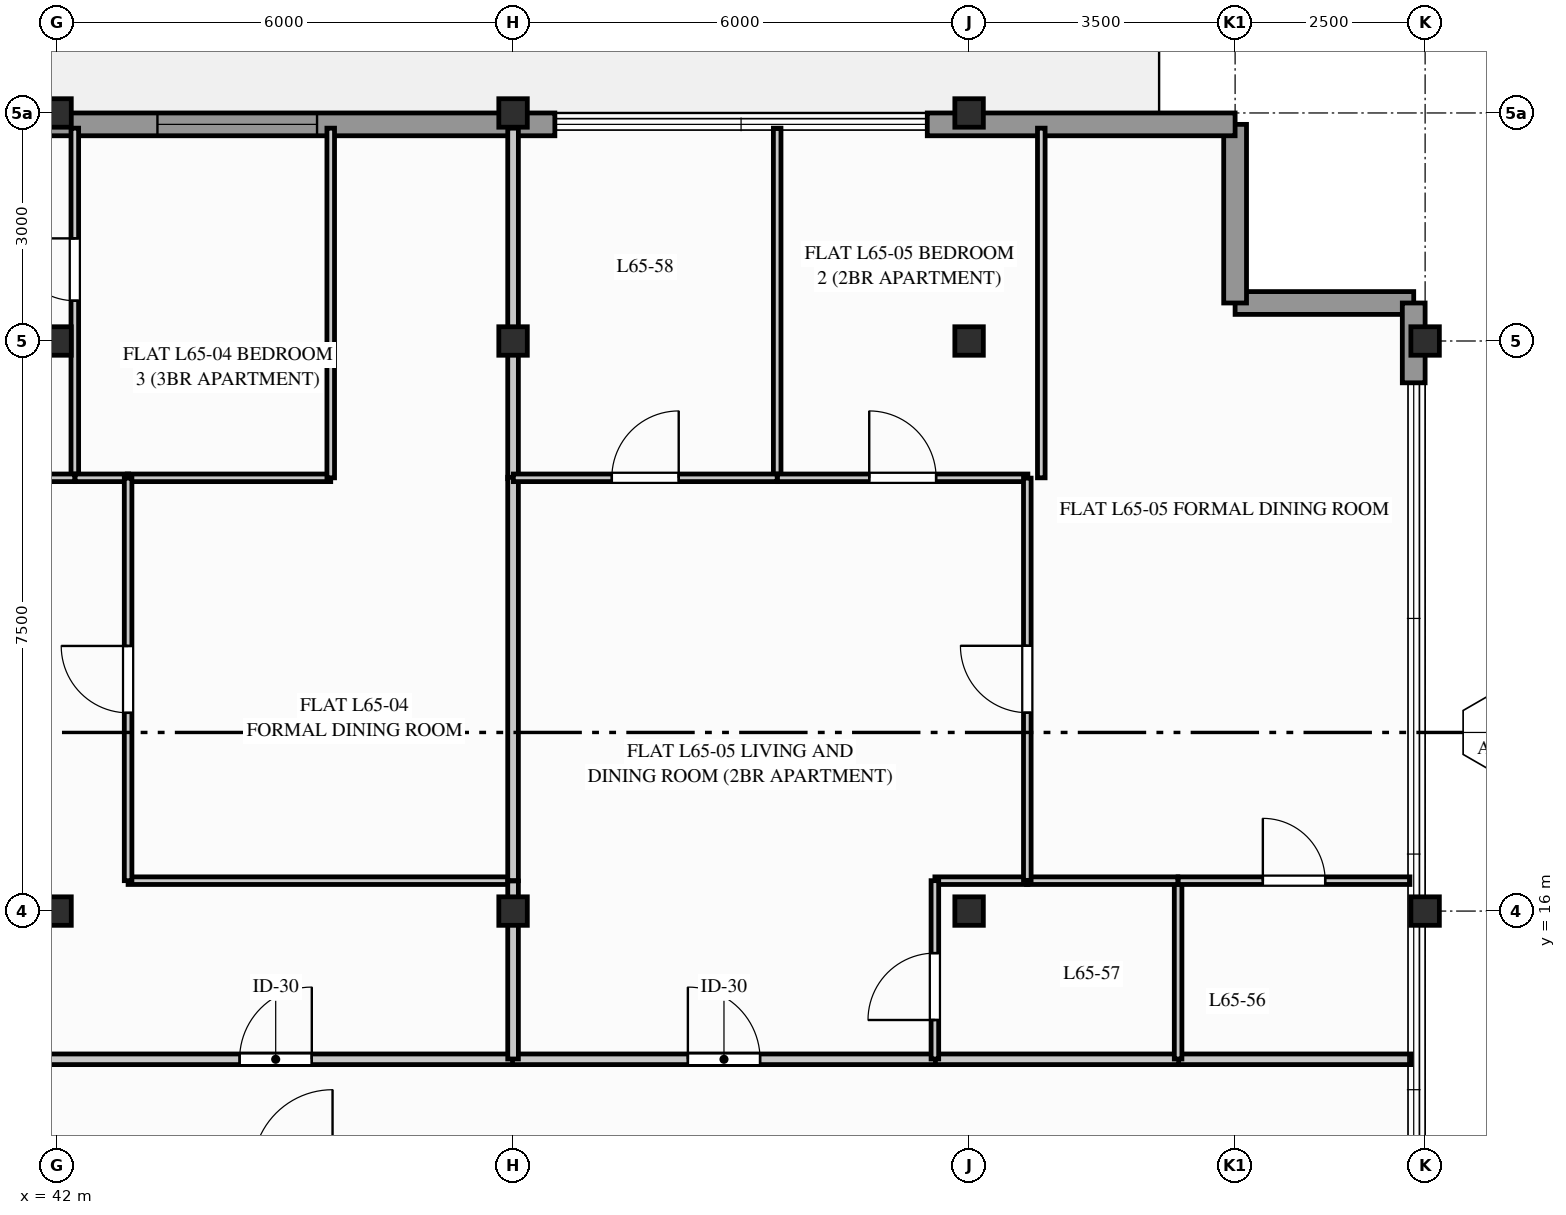
"""IFC4 building model, lengths in metres.
Left out: names, types, materials, properties, quantities, classifications, styles, units other than length and angle.
Written with IfcOpenShell. Run it as: python <this file> out.ifc"""

import sys

from ifc_helpers import new_model, si_unit, direction, frame, frame_2d, origin, origin_2d, place, context, subcontext, project, spatial, rectangle, i_section, extrude, element, fill, save


model = new_model("IFC4")
c1 = context("Model", 3, precision=1e-05, world=origin(), true_north=direction((0.0, 1.0)))
c2 = subcontext(c1, "Body", "Model", "MODEL_VIEW")
j1 = project(units=[si_unit("LENGTHUNIT", "METRE"), si_unit("PLANEANGLEUNIT", "RADIAN")], contexts=[c1])
p1 = place(None, origin())
s1 = spatial("IfcSite", under=j1, at=p1, CompositionType="ELEMENT")
p2 = place(p1, origin())
s2 = spatial("IfcBuilding", under=s1, at=p2, CompositionType="ELEMENT")
p3 = place(p2, frame((0.0, 0.0, 214.4)))
s3 = spatial("IfcBuildingStorey", under=s2, at=p3, CompositionType="ELEMENT", Elevation=214.4)
for number, where, z_axis, x_axis in (
    (1, (42.0, 16.0, 0.0), (0.0, 0.0, 1.0), (1.0, 0.0, 0.0)),
    (2, (42.0, 23.5, 0.0), (0.0, 0.0, 1.0), (1.0, 0.0, 0.0)),
    (3, (42.0, 26.5, 0.0), (0.0, 0.0, 1.0), (1.0, 0.0, 0.0)),
    (4, (48.0, 16.0, 0.0), (0.0, 0.0, 1.0), (1.0, 0.0, 0.0)),
    (5, (48.0, 23.5, 0.0), (0.0, 0.0, 1.0), (1.0, 0.0, 0.0)),
    (6, (48.0, 26.5, 0.0), (0.0, 0.0, 1.0), (1.0, 0.0, 0.0)),
    (7, (54.0, 16.0, 0.0), (0.0, 0.0, 1.0), (1.0, 0.0, 0.0)),
    (8, (54.0, 23.5, 0.0), (0.0, 0.0, 1.0), (1.0, 0.0, 0.0)),
    (9, (54.0, 26.5, 0.0), (0.0, 0.0, 1.0), (1.0, 0.0, 0.0)),
    (10, (60.0, 16.0, 0.0), (0.0, 0.0, 1.0), (1.0, 0.0, 0.0)),
    (11, (60.0, 23.5, 0.0), (0.0, 0.0, 1.0), (1.0, 0.0, 0.0)),
):
    element("IfcColumn", number, at=place(p3, frame(where, z_axis=z_axis, x_axis=x_axis)), inside=s3, PredefinedType="COLUMN", context=c2, shape_type="SweptSolid", body=[
        extrude(i_section(OverallWidth=0.375, OverallDepth=0.375, WebThickness=0.017, FlangeThickness=0.027, FilletRadius=0.015, at=origin_2d()), origin(), (0.0, 0.0, 1.0), 3.6),
    ])
for number, where, z_axis, x_axis in (
    (12, (59.85, 24.0, 0.0), (0.0, 0.0, 1.0), (-1.0, 0.0, 0.0)),
    (13, (57.5, 24.0, 0.0), (0.0, 0.0, 1.0), (0.0, 1.0, 0.0)),
):
    element("IfcWall", number, at=place(p3, frame(where, z_axis=z_axis, x_axis=x_axis)), inside=s3, PredefinedType="STANDARD", context=c2, shape_type="SweptSolid", body=[
        extrude(rectangle(XDim=2.35, YDim=0.3, at=frame_2d((1.175, 0.0))), origin(), (0.0, 0.0, 1.0), 3.33),
    ])
p4 = place(p3, frame((59.85, 22.95, 0.0), z_axis=(0.0, 0.0, 1.0), x_axis=(0.0, 1.0, 0.0)))
e14 = element("IfcWall", 14, at=p4, inside=s3, PredefinedType="STANDARD", context=c2, shape_type="SweptSolid", body=[
    extrude(rectangle(XDim=1.05, YDim=0.3, at=frame_2d((0.525, 0.0))), origin(), (0.0, 0.0, 1.0), 3.33),
])
p5 = place(p3, frame((53.45, 26.35, 0.0), z_axis=(0.0, 0.0, 1.0), x_axis=(1.0, 0.0, 0.0)))
e15 = element("IfcWall", 15, at=p5, inside=s3, PredefinedType="STANDARD", context=c2, shape_type="SweptSolid", body=[
    extrude(rectangle(XDim=4.05, YDim=0.3, at=frame_2d((2.025, 0.0))), origin(), (0.0, 0.0, 1.0), 3.33),
])
p6 = place(p3, frame((32.2, 26.35, 0.0), z_axis=(0.0, 0.0, 1.0), x_axis=(1.0, 0.0, 0.0)))
e16 = element("IfcWall", 16, at=p6, inside=s3, PredefinedType="STANDARD", context=c2, shape_type="SweptSolid", body=[
    extrude(rectangle(XDim=16.35, YDim=0.3, at=frame_2d((8.175, 0.0))), origin(), (0.0, 0.0, 1.0), 2.454),
])
p7 = place(p6, frame((7.6, 0.0, 0.0)))
e17 = element("IfcOpeningElement", 17, at=p7, cuts=e16, PredefinedType="OPENING", context=c2, shape_type="SweptSolid", body=[
    extrude(rectangle(XDim=1.1, YDim=2.2, at=frame_2d((0.55, 1.1))), frame((0.0, 0.16, 0.0), z_axis=(0.0, -1.0, 0.0), x_axis=(1.0, 0.0, 0.0)), (0.0, 0.0, 1.0), 0.32),
])
p8 = place(p6, frame((11.121, 0.0, 0.284)))
e18 = element("IfcOpeningElement", 18, at=p8, cuts=e16, PredefinedType="OPENING", context=c2, shape_type="SweptSolid", body=[
    extrude(rectangle(XDim=2.1, YDim=1.95, at=frame_2d((1.05, 0.975))), frame((0.0, 0.16, 0.0), z_axis=(0.0, -1.0, 0.0), x_axis=(1.0, 0.0, 0.0)), (0.0, 0.0, 1.0), 0.32),
])
p9 = place(p6, frame((4.006, 0.0, 0.634)))
e19 = element("IfcOpeningElement", 19, at=p9, cuts=e16, PredefinedType="OPENING", context=c2, shape_type="SweptSolid", body=[
    extrude(rectangle(XDim=1.2, YDim=1.6, at=frame_2d((0.6, 0.8))), frame((0.0, 0.16, 0.0), z_axis=(0.0, -1.0, 0.0), x_axis=(1.0, 0.0, 0.0)), (0.0, 0.0, 1.0), 0.32),
])
p10 = place(p3, frame((41.743, 14.05, 0.0), z_axis=(0.0, 0.0, 1.0), x_axis=(1.0, 0.0, 0.0)))
e20 = element("IfcWall", 20, at=p10, inside=s3, PredefinedType="PARTITIONING", context=c2, shape_type="SweptSolid", body=[
    extrude(rectangle(XDim=6.269, YDim=0.14, at=frame_2d((3.134, 0.0))), origin(), (0.0, 0.0, 1.0), 2.685),
])
p11 = place(p10, frame((2.659, 0.0, 0.0)))
e21 = element("IfcOpeningElement", 21, at=p11, cuts=e20, PredefinedType="OPENING", context=c2, shape_type="SweptSolid", body=[
    extrude(rectangle(XDim=0.95, YDim=2.05, at=frame_2d((0.475, 1.025))), frame((0.0, 0.08, 0.0), z_axis=(0.0, -1.0, 0.0), x_axis=(1.0, 0.0, 0.0)), (0.0, 0.0, 1.0), 0.16),
])
p12 = place(p3, frame((56.739, 14.05, 0.0), z_axis=(0.0, 0.0, 1.0), x_axis=(1.0, 0.0, 0.0)))
e22 = element("IfcWall", 22, at=p12, inside=s3, PredefinedType="PARTITIONING", context=c2, shape_type="SweptSolid", body=[
    extrude(rectangle(XDim=3.073, YDim=0.14, at=frame_2d((1.536, 0.0))), origin(), (0.0, 0.0, 1.0), 3.33),
])
p13 = place(p3, frame((53.539, 14.05, 0.0), z_axis=(0.0, 0.0, 1.0), x_axis=(1.0, 0.0, 0.0)))
e23 = element("IfcWall", 23, at=p13, inside=s3, PredefinedType="PARTITIONING", context=c2, shape_type="SweptSolid", body=[
    extrude(rectangle(XDim=3.219, YDim=0.14, at=frame_2d((1.609, 0.0))), origin(), (0.0, 0.0, 1.0), 2.685),
])
p14 = place(p3, frame((47.993, 14.05, 0.0), z_axis=(0.0, 0.0, 1.0), x_axis=(1.0, 0.0, 0.0)))
e24 = element("IfcWall", 24, at=p14, inside=s3, PredefinedType="PARTITIONING", context=c2, shape_type="SweptSolid", body=[
    extrude(rectangle(XDim=5.565, YDim=0.14, at=frame_2d((2.782, 0.0))), origin(), (0.0, 0.0, 1.0), 2.685),
])
p15 = place(p14, frame((2.307, 0.0, 0.0)))
e25 = element("IfcOpeningElement", 25, at=p15, cuts=e24, PredefinedType="OPENING", context=c2, shape_type="SweptSolid", body=[
    extrude(rectangle(XDim=0.95, YDim=2.05, at=frame_2d((0.475, 1.025))), frame((0.0, 0.08, 0.0), z_axis=(0.0, -1.0, 0.0), x_axis=(1.0, 0.0, 0.0)), (0.0, 0.0, 1.0), 0.16),
])
p16 = place(p3, frame((42.234, 21.7, 0.0), z_axis=(0.0, 0.0, 1.0), x_axis=(0.0, 1.0, 0.0)))
e26 = element("IfcWall", 26, at=p16, inside=s3, PredefinedType="PARTITIONING", context=c2, shape_type="SweptSolid", body=[
    extrude(rectangle(XDim=4.6, YDim=0.1, at=frame_2d((2.3, 0.0))), origin(), (0.0, 0.0, 1.0), 2.685),
])
p17 = place(p16, frame((2.33, 0.0, 0.0)))
e27 = element("IfcOpeningElement", 27, at=p17, cuts=e26, PredefinedType="OPENING", context=c2, shape_type="SweptSolid", body=[
    extrude(rectangle(XDim=0.82, YDim=2.02, at=frame_2d((0.41, 1.01))), frame((0.0, 0.06, 0.0), z_axis=(0.0, -1.0, 0.0), x_axis=(1.0, 0.0, 0.0)), (0.0, 0.0, 1.0), 0.12),
])
p18 = place(p3, frame((38.871, 21.7, 0.0), z_axis=(0.0, 0.0, 1.0), x_axis=(1.0, 0.0, 0.0)))
e28 = element("IfcWall", 28, at=p18, inside=s3, PredefinedType="PARTITIONING", context=c2, shape_type="SweptSolid", body=[
    extrude(rectangle(XDim=3.363, YDim=0.1, at=frame_2d((1.681, 0.0))), origin(), (0.0, 0.0, 1.0), 2.685),
])
p19 = place(p18, frame((1.241, 0.0, 0.0)))
e29 = element("IfcOpeningElement", 29, at=p19, cuts=e28, PredefinedType="OPENING", context=c2, shape_type="SweptSolid", body=[
    extrude(rectangle(XDim=0.88, YDim=2.04, at=frame_2d((0.44, 1.02))), frame((0.0, 0.06, 0.0), z_axis=(0.0, -1.0, 0.0), x_axis=(1.0, 0.0, 0.0)), (0.0, 0.0, 1.0), 0.12),
])
p20 = place(p3, frame((42.924, 21.7, 0.0), z_axis=(0.0, 0.0, 1.0), x_axis=(1.0, 0.0, 0.0)))
e30 = element("IfcWall", 30, at=p20, inside=s3, PredefinedType="PARTITIONING", context=c2, shape_type="SweptSolid", body=[
    extrude(rectangle(XDim=2.677, YDim=0.1, at=frame_2d((1.339, 0.0))), origin(), (0.0, 0.0, 1.0), 3.33),
])
p21 = place(p3, frame((45.601, 21.7, 0.0), z_axis=(0.0, 0.0, 1.0), x_axis=(0.0, 1.0, 0.0)))
e31 = element("IfcWall", 31, at=p21, inside=s3, PredefinedType="PARTITIONING", context=c2, shape_type="SweptSolid", body=[
    extrude(rectangle(XDim=4.6, YDim=0.1, at=frame_2d((2.3, 0.0))), origin(), (0.0, 0.0, 1.0), 2.685),
])
p22 = place(p3, frame((42.238, 21.7, 0.0), z_axis=(0.0, 0.0, 1.0), x_axis=(1.0, 0.0, 0.0)))
e32 = element("IfcWall", 32, at=p22, inside=s3, PredefinedType="PARTITIONING", context=c2, shape_type="SweptSolid", body=[
    extrude(rectangle(XDim=0.704, YDim=0.1, at=frame_2d((0.352, 0.0))), origin(), (0.0, 0.0, 1.0), 3.33),
])
p23 = place(p3, frame((42.935, 16.4, 0.0), z_axis=(0.0, 0.0, 1.0), x_axis=(1.0, 0.0, 0.0)))
e33 = element("IfcWall", 33, at=p23, inside=s3, PredefinedType="PARTITIONING", context=c2, shape_type="SweptSolid", body=[
    extrude(rectangle(XDim=5.065, YDim=0.1, at=frame_2d((2.532, 0.0))), origin(), (0.0, 0.0, 1.0), 2.685),
])
p24 = place(p3, frame((42.935, 16.4, 0.0), z_axis=(0.0, 0.0, 1.0), x_axis=(0.0, 1.0, 0.0)))
e34 = element("IfcWall", 34, at=p24, inside=s3, PredefinedType="PARTITIONING", context=c2, shape_type="SweptSolid", body=[
    extrude(rectangle(XDim=5.296, YDim=0.1, at=frame_2d((2.648, 0.0))), origin(), (0.0, 0.0, 1.0), 2.899),
])
p25 = place(p24, frame((2.208, 0.0, 0.0)))
e35 = element("IfcOpeningElement", 35, at=p25, cuts=e34, PredefinedType="OPENING", context=c2, shape_type="SweptSolid", body=[
    extrude(rectangle(XDim=0.88, YDim=2.04, at=frame_2d((0.44, 1.02))), frame((0.0, 0.06, 0.0), z_axis=(0.0, -1.0, 0.0), x_axis=(1.0, 0.0, 0.0)), (0.0, 0.0, 1.0), 0.12),
])
p26 = place(p3, frame((48.0, 21.689, 0.0), z_axis=(0.0, 0.0, 1.0), x_axis=(0.0, 1.0, 0.0)))
e36 = element("IfcWall", 36, at=p26, inside=s3, PredefinedType="PARTITIONING", context=c2, shape_type="SweptSolid", body=[
    extrude(rectangle(XDim=4.611, YDim=0.14, at=frame_2d((2.306, 0.0))), origin(), (0.0, 0.0, 1.0), 2.685),
])
p27 = place(p3, frame((48.0, 16.4, 0.0), z_axis=(0.0, 0.0, 1.0), x_axis=(0.0, 1.0, 0.0)))
e37 = element("IfcWall", 37, at=p27, inside=s3, PredefinedType="PARTITIONING", context=c2, shape_type="SweptSolid", body=[
    extrude(rectangle(XDim=5.307, YDim=0.14, at=frame_2d((2.654, 0.0))), origin(), (0.0, 0.0, 1.0), 2.685),
])
p28 = place(p3, frame((48.0, 14.054, 0.0), z_axis=(0.0, 0.0, 1.0), x_axis=(0.0, 1.0, 0.0)))
e38 = element("IfcWall", 38, at=p28, inside=s3, PredefinedType="PARTITIONING", context=c2, shape_type="SweptSolid", body=[
    extrude(rectangle(XDim=2.342, YDim=0.14, at=frame_2d((1.171, 0.0))), origin(), (0.0, 0.0, 1.0), 2.685),
])
p29 = place(p3, frame((56.75, 14.054, 0.0), z_axis=(0.0, 0.0, 1.0), x_axis=(0.0, 1.0, 0.0)))
e39 = element("IfcWall", 39, at=p29, inside=s3, PredefinedType="PARTITIONING", context=c2, shape_type="SweptSolid", body=[
    extrude(rectangle(XDim=2.346, YDim=0.1, at=frame_2d((1.173, 0.0))), origin(), (0.0, 0.0, 1.0), 2.685),
])
p30 = place(p3, frame((56.75, 16.4, 0.0), z_axis=(0.0, 0.0, 1.0), x_axis=(1.0, 0.0, 0.0)))
e40 = element("IfcWall", 40, at=p30, inside=s3, PredefinedType="PARTITIONING", context=c2, shape_type="SweptSolid", body=[
    extrude(rectangle(XDim=3.05, YDim=0.1, at=frame_2d((1.525, 0.0))), origin(), (0.0, 0.0, 1.0), 3.33),
])
p31 = place(p30, frame((1.115, 0.0, 0.0)))
e41 = element("IfcOpeningElement", 41, at=p31, cuts=e40, PredefinedType="OPENING", context=c2, shape_type="SweptSolid", body=[
    extrude(rectangle(XDim=0.82, YDim=2.02, at=frame_2d((0.41, 1.01))), frame((0.0, 0.06, 0.0), z_axis=(0.0, -1.0, 0.0), x_axis=(1.0, 0.0, 0.0)), (0.0, 0.0, 1.0), 0.12),
])
p32 = place(p3, frame((54.755, 16.4, 0.0), z_axis=(0.0, 0.0, 1.0), x_axis=(1.0, 0.0, 0.0)))
e42 = element("IfcWall", 42, at=p32, inside=s3, PredefinedType="PARTITIONING", context=c2, shape_type="SweptSolid", body=[
    extrude(rectangle(XDim=1.991, YDim=0.1, at=frame_2d((0.996, 0.0))), origin(), (0.0, 0.0, 1.0), 3.33),
])
p33 = place(p3, frame((53.55, 16.4, 0.0), z_axis=(0.0, 0.0, 1.0), x_axis=(1.0, 0.0, 0.0)))
e43 = element("IfcWall", 43, at=p33, inside=s3, PredefinedType="PARTITIONING", context=c2, shape_type="SweptSolid", body=[
    extrude(rectangle(XDim=1.223, YDim=0.1, at=frame_2d((0.612, 0.0))), origin(), (0.0, 0.0, 1.0), 2.685),
])
p34 = place(p3, frame((53.55, 14.054, 0.0), z_axis=(0.0, 0.0, 1.0), x_axis=(0.0, 1.0, 0.0)))
e44 = element("IfcWall", 44, at=p34, inside=s3, PredefinedType="PARTITIONING", context=c2, shape_type="SweptSolid", body=[
    extrude(rectangle(XDim=2.346, YDim=0.1, at=frame_2d((1.173, 0.0))), origin(), (0.0, 0.0, 1.0), 2.685),
])
p35 = place(p34, frame((0.513, 0.0, 0.0)))
e45 = element("IfcOpeningElement", 45, at=p35, cuts=e44, PredefinedType="OPENING", context=c2, shape_type="SweptSolid", body=[
    extrude(rectangle(XDim=0.88, YDim=2.04, at=frame_2d((0.44, 1.02))), frame((0.0, 0.06, 0.0), z_axis=(0.0, -1.0, 0.0), x_axis=(1.0, 0.0, 0.0)), (0.0, 0.0, 1.0), 0.12),
])
p36 = place(p3, frame((51.475, 21.7, 0.0), z_axis=(0.0, 0.0, 1.0), x_axis=(0.0, 1.0, 0.0)))
e46 = element("IfcWall", 46, at=p36, inside=s3, PredefinedType="PARTITIONING", context=c2, shape_type="SweptSolid", body=[
    extrude(rectangle(XDim=4.6, YDim=0.1, at=frame_2d((2.3, 0.0))), origin(), (0.0, 0.0, 1.0), 2.685),
])
p37 = place(p3, frame((48.004, 21.7, 0.0), z_axis=(0.0, 0.0, 1.0), x_axis=(1.0, 0.0, 0.0)))
e47 = element("IfcWall", 47, at=p37, inside=s3, PredefinedType="PARTITIONING", context=c2, shape_type="SweptSolid", body=[
    extrude(rectangle(XDim=3.471, YDim=0.1, at=frame_2d((1.736, 0.0))), origin(), (0.0, 0.0, 1.0), 2.685),
])
p38 = place(p37, frame((1.295, 0.0, 0.0)))
e48 = element("IfcOpeningElement", 48, at=p38, cuts=e47, PredefinedType="OPENING", context=c2, shape_type="SweptSolid", body=[
    extrude(rectangle(XDim=0.88, YDim=2.04, at=frame_2d((0.44, 1.02))), frame((0.0, 0.06, 0.0), z_axis=(0.0, -1.0, 0.0), x_axis=(1.0, 0.0, 0.0)), (0.0, 0.0, 1.0), 0.12),
])
p39 = place(p3, frame((54.95, 21.7, 0.0), z_axis=(0.0, 0.0, 1.0), x_axis=(0.0, 1.0, 0.0)))
e49 = element("IfcWall", 49, at=p39, inside=s3, PredefinedType="PARTITIONING", context=c2, shape_type="SweptSolid", body=[
    extrude(rectangle(XDim=4.6, YDim=0.1, at=frame_2d((2.3, 0.0))), origin(), (0.0, 0.0, 1.0), 2.685),
])
p40 = place(p3, frame((51.479, 21.7, 0.0), z_axis=(0.0, 0.0, 1.0), x_axis=(1.0, 0.0, 0.0)))
e50 = element("IfcWall", 50, at=p40, inside=s3, PredefinedType="PARTITIONING", context=c2, shape_type="SweptSolid", body=[
    extrude(rectangle(XDim=3.294, YDim=0.1, at=frame_2d((1.647, 0.0))), origin(), (0.0, 0.0, 1.0), 2.685),
])
p41 = place(p40, frame((1.207, 0.0, 0.0)))
e51 = element("IfcOpeningElement", 51, at=p41, cuts=e50, PredefinedType="OPENING", context=c2, shape_type="SweptSolid", body=[
    extrude(rectangle(XDim=0.88, YDim=2.04, at=frame_2d((0.44, 1.02))), frame((0.0, 0.06, 0.0), z_axis=(0.0, -1.0, 0.0), x_axis=(1.0, 0.0, 0.0)), (0.0, 0.0, 1.0), 0.12),
])
p42 = place(p3, frame((54.766, 16.404, 0.0), z_axis=(0.0, 0.0, 1.0), x_axis=(0.0, 1.0, 0.0)))
e52 = element("IfcWall", 52, at=p42, inside=s3, PredefinedType="PARTITIONING", context=c2, shape_type="SweptSolid", body=[
    extrude(rectangle(XDim=5.292, YDim=0.1, at=frame_2d((2.646, 0.0))), origin(), (0.0, 0.0, 1.0), 2.899),
])
p43 = place(p42, frame((2.206, 0.0, 0.0)))
e53 = element("IfcOpeningElement", 53, at=p43, cuts=e52, PredefinedType="OPENING", context=c2, shape_type="SweptSolid", body=[
    extrude(rectangle(XDim=0.88, YDim=2.04, at=frame_2d((0.44, 1.02))), frame((0.0, 0.06, 0.0), z_axis=(0.0, -1.0, 0.0), x_axis=(1.0, 0.0, 0.0)), (0.0, 0.0, 1.0), 0.12),
])
p44 = place(p8, origin())
e54 = element("IfcWindow", 54, at=p44, inside=s3, PartitioningType="SINGLE_PANEL", PredefinedType="WINDOW", context=c2, shape_type="SweptSolid", body=[
    extrude(rectangle(XDim=2.1, YDim=1.95, at=frame_2d((1.05, 0.975))), frame((0.0, 0.03, 0.0), z_axis=(0.0, -1.0, 0.0), x_axis=(1.0, 0.0, 0.0)), (0.0, 0.0, 1.0), 0.06),
])
fill(e18, e54)
p45 = place(p11, origin())
e55 = element("IfcDoor", 55, at=p45, inside=s3, OperationType="SINGLE_SWING_RIGHT", PredefinedType="DOOR", context=c2, shape_type="SweptSolid", body=[
    extrude(rectangle(XDim=0.95, YDim=2.05, at=frame_2d((0.475, 1.025))), frame((0.0, 0.025, 0.0), z_axis=(0.0, -1.0, 0.0), x_axis=(1.0, 0.0, 0.0)), (0.0, 0.0, 1.0), 0.05),
])
fill(e21, e55)
p46 = place(p15, origin())
e56 = element("IfcDoor", 56, at=p46, inside=s3, OperationType="SINGLE_SWING_LEFT", PredefinedType="DOOR", context=c2, shape_type="SweptSolid", body=[
    extrude(rectangle(XDim=0.95, YDim=2.05, at=frame_2d((0.475, 1.025))), frame((0.0, 0.025, 0.0), z_axis=(0.0, -1.0, 0.0), x_axis=(1.0, 0.0, 0.0)), (0.0, 0.0, 1.0), 0.05),
])
fill(e25, e56)
p47 = place(p25, origin())
e57 = element("IfcDoor", 57, at=p47, inside=s3, OperationType="SINGLE_SWING_RIGHT", PredefinedType="DOOR", context=c2, shape_type="SweptSolid", body=[
    extrude(rectangle(XDim=0.88, YDim=2.04, at=frame_2d((0.44, 1.02))), frame((0.0, 0.025, 0.0), z_axis=(0.0, -1.0, 0.0), x_axis=(1.0, 0.0, 0.0)), (0.0, 0.0, 1.0), 0.05),
])
fill(e35, e57)
p48 = place(p35, origin())
e58 = element("IfcDoor", 58, at=p48, inside=s3, OperationType="SINGLE_SWING_LEFT", PredefinedType="DOOR", context=c2, shape_type="SweptSolid", body=[
    extrude(rectangle(XDim=0.88, YDim=2.04, at=frame_2d((0.44, 1.02))), frame((0.0, 0.025, 0.0), z_axis=(0.0, -1.0, 0.0), x_axis=(1.0, 0.0, 0.0)), (0.0, 0.0, 1.0), 0.05),
])
fill(e45, e58)
p49 = place(p38, origin())
e59 = element("IfcDoor", 59, at=p49, inside=s3, OperationType="SINGLE_SWING_RIGHT", PredefinedType="DOOR", context=c2, shape_type="SweptSolid", body=[
    extrude(rectangle(XDim=0.88, YDim=2.04, at=frame_2d((0.44, 1.02))), frame((0.0, 0.025, 0.0), z_axis=(0.0, -1.0, 0.0), x_axis=(1.0, 0.0, 0.0)), (0.0, 0.0, 1.0), 0.05),
])
fill(e48, e59)
p50 = place(p41, origin())
e60 = element("IfcDoor", 60, at=p50, inside=s3, OperationType="SINGLE_SWING_LEFT", PredefinedType="DOOR", context=c2, shape_type="SweptSolid", body=[
    extrude(rectangle(XDim=0.88, YDim=2.04, at=frame_2d((0.44, 1.02))), frame((0.0, 0.025, 0.0), z_axis=(0.0, -1.0, 0.0), x_axis=(1.0, 0.0, 0.0)), (0.0, 0.0, 1.0), 0.05),
])
fill(e51, e60)
p51 = place(p43, origin())
e61 = element("IfcDoor", 61, at=p51, inside=s3, OperationType="SINGLE_SWING_RIGHT", PredefinedType="DOOR", context=c2, shape_type="SweptSolid", body=[
    extrude(rectangle(XDim=0.88, YDim=2.04, at=frame_2d((0.44, 1.02))), frame((0.0, 0.025, 0.0), z_axis=(0.0, -1.0, 0.0), x_axis=(1.0, 0.0, 0.0)), (0.0, 0.0, 1.0), 0.05),
])
fill(e53, e61)
p52 = place(p17, origin())
e62 = element("IfcDoor", 62, at=p52, inside=s3, OperationType="SINGLE_SWING_RIGHT", PredefinedType="DOOR", context=c2, shape_type="SweptSolid", body=[
    extrude(rectangle(XDim=0.82, YDim=2.02, at=frame_2d((0.41, 1.01))), frame((0.0, 0.025, 0.0), z_axis=(0.0, -1.0, 0.0), x_axis=(1.0, 0.0, 0.0)), (0.0, 0.0, 1.0), 0.05),
])
fill(e27, e62)
p53 = place(p31, origin())
e63 = element("IfcDoor", 63, at=p53, inside=s3, OperationType="SINGLE_SWING_LEFT", PredefinedType="DOOR", context=c2, shape_type="SweptSolid", body=[
    extrude(rectangle(XDim=0.82, YDim=2.02, at=frame_2d((0.41, 1.01))), frame((0.0, 0.025, 0.0), z_axis=(0.0, -1.0, 0.0), x_axis=(1.0, 0.0, 0.0)), (0.0, 0.0, 1.0), 0.05),
])
fill(e41, e63)
save(model, sys.argv[1])
